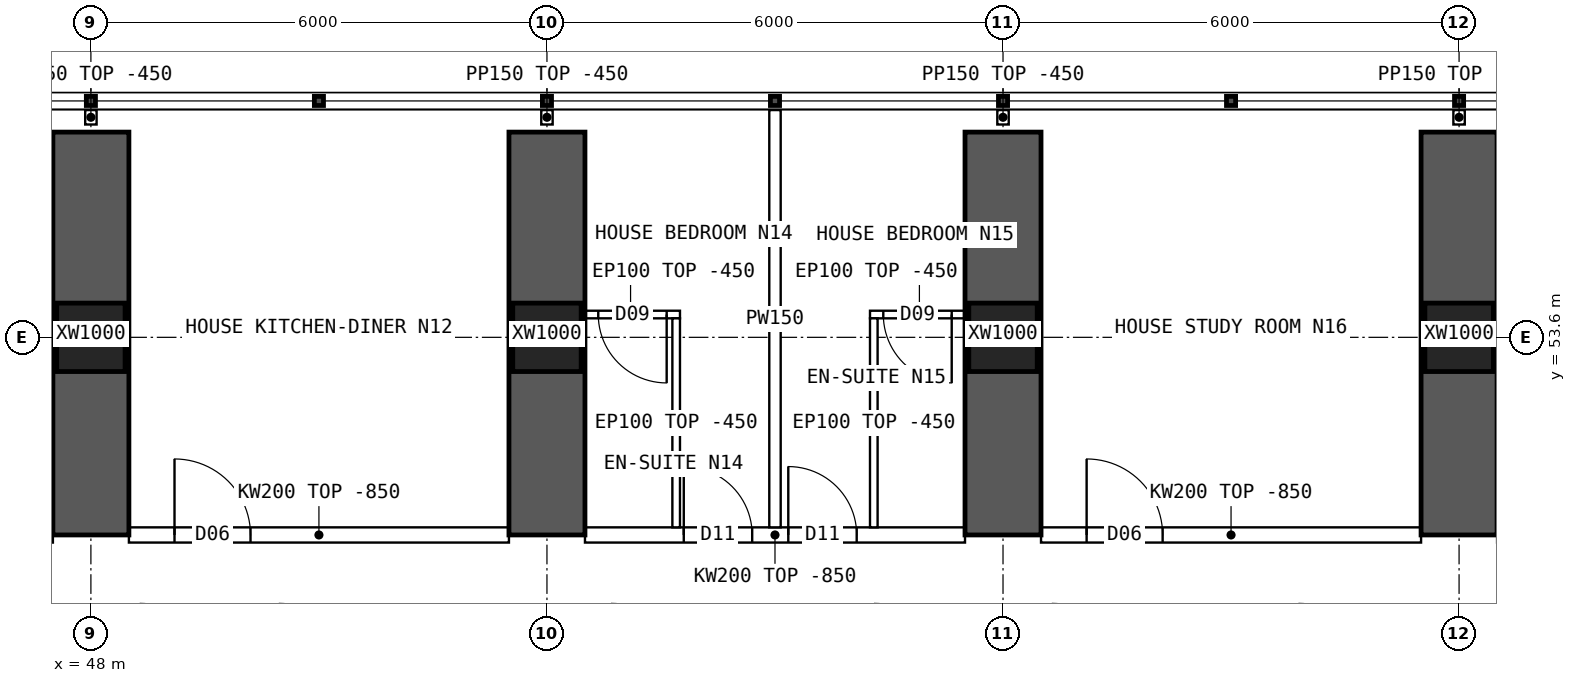
"""IFC4 building model, lengths in metres.
Left out: names, types, materials, properties, quantities, classifications, styles, units other than length and angle.
Written with IfcOpenShell. Run it as: python <this file> out.ifc"""

import sys

from ifc_helpers import new_model, si_unit, direction, frame, frame_2d, origin, origin_2d, place, context, subcontext, project, spatial, polyline, rectangle, hollow_rectangle, outline, extrude, element, fill, save


model = new_model("IFC4")
c1 = context("Model", 3, precision=1e-05, world=origin(), true_north=direction((0.0, 1.0)))
c2 = subcontext(c1, "Body", "Model", "MODEL_VIEW")
j1 = project(units=[si_unit("LENGTHUNIT", "METRE"), si_unit("PLANEANGLEUNIT", "RADIAN")], contexts=[c1])
p1 = place(None, origin())
s1 = spatial("IfcSite", under=j1, at=p1, CompositionType="ELEMENT")
p2 = place(p1, origin())
s2 = spatial("IfcBuilding", under=s1, at=p2, CompositionType="ELEMENT")
p3 = place(p2, frame((0.0, 0.0, 50.2)))
s3 = spatial("IfcBuildingStorey", under=s2, at=p3, CompositionType="ELEMENT", Elevation=50.2)
for number, where, z_axis, x_axis in (
    (1, (48.0, 53.6, 0.0), (0.0, 0.0, 1.0), (1.0, 0.0, 0.0)),
    (2, (54.0, 53.6, 0.0), (0.0, 0.0, 1.0), (1.0, 0.0, 0.0)),
    (3, (60.0, 53.6, 0.0), (0.0, 0.0, 1.0), (1.0, 0.0, 0.0)),
    (4, (66.0, 53.6, 0.0), (0.0, 0.0, 1.0), (1.0, 0.0, 0.0)),
):
    element("IfcColumn", number, at=place(p3, frame(where, z_axis=z_axis, x_axis=x_axis)), inside=s3, PredefinedType="COLUMN", context=c2, shape_type="SweptSolid", body=[
        extrude(hollow_rectangle(XDim=0.9, YDim=0.9, WallThickness=0.09, at=origin_2d()), origin(), (0.0, 0.0, 1.0), 3.75),
    ])
for number, where, z_axis, x_axis in (
    (5, (48.0, 51.0, 0.0), (0.0, 0.0, 1.0), (0.0, 1.0, 0.0)),
    (6, (54.0, 51.0, 0.0), (0.0, 0.0, 1.0), (0.0, 1.0, 0.0)),
    (7, (60.0, 51.0, 0.0), (0.0, 0.0, 1.0), (0.0, 1.0, 0.0)),
    (8, (66.0, 51.0, 0.0), (0.0, 0.0, 1.0), (0.0, 1.0, 0.0)),
):
    element("IfcWall", number, at=place(p3, frame(where, z_axis=z_axis, x_axis=x_axis)), inside=s3, PredefinedType="SHEAR", context=c2, shape_type="SweptSolid", body=[
        extrude(rectangle(XDim=5.3, YDim=1.0, at=frame_2d((2.65, 0.0))), origin(), (0.0, 0.0, 1.0), 3.75),
    ])
p4 = place(p3, frame((48.5, 51.0, 0.0), z_axis=(0.0, 0.0, 1.0), x_axis=(1.0, 0.0, 0.0)))
e9 = element("IfcWall", 9, at=p4, inside=s3, PredefinedType="SOLIDWALL", context=c2, shape_type="SweptSolid", body=[
    extrude(outline(polyline([(0.0, 0.0), (5.0, 0.0), (5.0, 2.9), (0.0, 2.9), (0.0, 0.0)])), frame((0.0, 0.1, 0.0), z_axis=(0.0, -1.0, 0.0), x_axis=(1.0, 0.0, 0.0)), (0.0, 0.0, 1.0), 0.2),
])
p5 = place(p4, frame((0.6, 0.0, 0.0)))
e10 = element("IfcOpeningElement", 10, at=p5, cuts=e9, PredefinedType="OPENING", context=c2, shape_type="SweptSolid", body=[
    extrude(rectangle(XDim=1.0, YDim=2.1, at=frame_2d((0.5, 1.05))), frame((0.0, 0.11, 0.0), z_axis=(0.0, -1.0, 0.0), x_axis=(1.0, 0.0, 0.0)), (0.0, 0.0, 1.0), 0.22),
])
p6 = place(p3, frame((54.5, 51.0, 0.0), z_axis=(0.0, 0.0, 1.0), x_axis=(1.0, 0.0, 0.0)))
e11 = element("IfcWall", 11, at=p6, inside=s3, PredefinedType="SOLIDWALL", context=c2, shape_type="SweptSolid", body=[
    extrude(outline(polyline([(0.0, 0.0), (5.0, 0.0), (5.0, 2.9), (0.0, 2.9), (0.0, 0.0)])), frame((0.0, 0.1, 0.0), z_axis=(0.0, -1.0, 0.0), x_axis=(1.0, 0.0, 0.0)), (0.0, 0.0, 1.0), 0.2),
])
p7 = place(p6, frame((1.3, 0.0, 0.0)))
e12 = element("IfcOpeningElement", 12, at=p7, cuts=e11, PredefinedType="OPENING", context=c2, shape_type="SweptSolid", body=[
    extrude(rectangle(XDim=0.9, YDim=2.1, at=frame_2d((0.45, 1.05))), frame((0.0, 0.11, 0.0), z_axis=(0.0, -1.0, 0.0), x_axis=(1.0, 0.0, 0.0)), (0.0, 0.0, 1.0), 0.22),
])
p8 = place(p6, frame((2.675, 0.0, 0.0)))
e13 = element("IfcOpeningElement", 13, at=p8, cuts=e11, PredefinedType="OPENING", context=c2, shape_type="SweptSolid", body=[
    extrude(rectangle(XDim=0.9, YDim=2.1, at=frame_2d((0.45, 1.05))), frame((0.0, 0.11, 0.0), z_axis=(0.0, -1.0, 0.0), x_axis=(1.0, 0.0, 0.0)), (0.0, 0.0, 1.0), 0.22),
])
p9 = place(p3, frame((60.5, 51.0, 0.0), z_axis=(0.0, 0.0, 1.0), x_axis=(1.0, 0.0, 0.0)))
e14 = element("IfcWall", 14, at=p9, inside=s3, PredefinedType="SOLIDWALL", context=c2, shape_type="SweptSolid", body=[
    extrude(outline(polyline([(0.0, 0.0), (5.0, 0.0), (5.0, 2.9), (0.0, 2.9), (0.0, 0.0)])), frame((0.0, 0.1, 0.0), z_axis=(0.0, -1.0, 0.0), x_axis=(1.0, 0.0, 0.0)), (0.0, 0.0, 1.0), 0.2),
])
p10 = place(p9, frame((0.6, 0.0, 0.0)))
e15 = element("IfcOpeningElement", 15, at=p10, cuts=e14, PredefinedType="OPENING", context=c2, shape_type="SweptSolid", body=[
    extrude(rectangle(XDim=1.0, YDim=2.1, at=frame_2d((0.5, 1.05))), frame((0.0, 0.11, 0.0), z_axis=(0.0, -1.0, 0.0), x_axis=(1.0, 0.0, 0.0)), (0.0, 0.0, 1.0), 0.22),
])
p11 = place(p3, frame((57.0, 56.59, 0.0), z_axis=(0.0, 0.0, 1.0), x_axis=(0.0, -1.0, 0.0)))
e16 = element("IfcWall", 16, at=p11, inside=s3, PredefinedType="PARTITIONING", context=c2, shape_type="SweptSolid", body=[
    extrude(outline(polyline([(0.0, 0.0), (5.49, 0.0), (5.49, 2.9), (5.442, 2.9), (5.44, 3.3), (3.192, 3.3), (3.19, 2.9), (2.792, 2.9), (2.79, 3.3), (0.0, 3.3), (0.0, 0.0)])), frame((0.0, 0.075, 0.0), z_axis=(0.0, -1.0, 0.0), x_axis=(1.0, 0.0, 0.0)), (0.0, 0.0, 1.0), 0.15),
])
p12 = place(p3, frame((54.45, 53.9, 0.0), z_axis=(0.0, 0.0, 1.0), x_axis=(1.0, 0.0, 0.0)))
e17 = element("IfcWall", 17, at=p12, inside=s3, PredefinedType="PARTITIONING", context=c2, shape_type="SweptSolid", body=[
    extrude(rectangle(XDim=1.3, YDim=0.1, at=frame_2d((0.65, 0.0))), origin(), (0.0, 0.0, 1.0), 3.3),
])
p13 = place(p12, frame((0.225, 0.0, 0.0)))
e18 = element("IfcOpeningElement", 18, at=p13, cuts=e17, PredefinedType="OPENING", context=c2, shape_type="SweptSolid", body=[
    extrude(rectangle(XDim=0.9, YDim=2.1, at=frame_2d((0.45, 1.05))), frame((0.0, 0.06, 0.0), z_axis=(0.0, -1.0, 0.0), x_axis=(1.0, 0.0, 0.0)), (0.0, 0.0, 1.0), 0.12),
])
p14 = place(p3, frame((55.7, 53.85, 0.0), z_axis=(0.0, 0.0, 1.0), x_axis=(0.0, -1.0, 0.0)))
e19 = element("IfcWall", 19, at=p14, inside=s3, PredefinedType="PARTITIONING", context=c2, shape_type="SweptSolid", body=[
    extrude(outline(polyline([(0.0, 0.0), (2.75, 0.0), (2.75, 2.9), (2.702, 2.9), (2.7, 3.3), (0.452, 3.3), (0.45, 2.9), (0.0, 2.9), (0.0, 0.0)])), frame((0.0, 0.05, 0.0), z_axis=(0.0, -1.0, 0.0), x_axis=(1.0, 0.0, 0.0)), (0.0, 0.0, 1.0), 0.1),
])
p15 = place(p3, frame((58.25, 53.9, 0.0), z_axis=(0.0, 0.0, 1.0), x_axis=(1.0, 0.0, 0.0)))
e20 = element("IfcWall", 20, at=p15, inside=s3, PredefinedType="PARTITIONING", context=c2, shape_type="SweptSolid", body=[
    extrude(rectangle(XDim=1.3, YDim=0.1, at=frame_2d((0.65, 0.0))), origin(), (0.0, 0.0, 1.0), 3.3),
])
p16 = place(p15, frame((0.175, 0.0, 0.0)))
e21 = element("IfcOpeningElement", 21, at=p16, cuts=e20, PredefinedType="OPENING", context=c2, shape_type="SweptSolid", body=[
    extrude(rectangle(XDim=0.9, YDim=2.1, at=frame_2d((0.45, 1.05))), frame((0.0, 0.06, 0.0), z_axis=(0.0, -1.0, 0.0), x_axis=(1.0, 0.0, 0.0)), (0.0, 0.0, 1.0), 0.12),
])
p17 = place(p3, frame((58.3, 53.85, 0.0), z_axis=(0.0, 0.0, 1.0), x_axis=(0.0, -1.0, 0.0)))
e22 = element("IfcWall", 22, at=p17, inside=s3, PredefinedType="PARTITIONING", context=c2, shape_type="SweptSolid", body=[
    extrude(outline(polyline([(0.0, 0.0), (2.75, 0.0), (2.75, 2.9), (2.702, 2.9), (2.7, 3.3), (0.452, 3.3), (0.45, 2.9), (0.0, 2.9), (0.0, 0.0)])), frame((0.0, 0.05, 0.0), z_axis=(0.0, -1.0, 0.0), x_axis=(1.0, 0.0, 0.0)), (0.0, 0.0, 1.0), 0.1),
])
p18 = place(p3, frame((66.45, 53.9, 0.0), z_axis=(0.0, 0.0, 1.0), x_axis=(1.0, 0.0, 0.0)))
e23 = element("IfcWall", 23, at=p18, inside=s3, PredefinedType="PARTITIONING", context=c2, shape_type="SweptSolid", body=[
    extrude(rectangle(XDim=1.3, YDim=0.1, at=frame_2d((0.65, 0.0))), origin(), (0.0, 0.0, 1.0), 3.3),
])
p19 = place(p18, frame((0.225, 0.0, 0.0)))
e24 = element("IfcOpeningElement", 24, at=p19, cuts=e23, PredefinedType="OPENING", context=c2, shape_type="SweptSolid", body=[
    extrude(rectangle(XDim=0.9, YDim=2.1, at=frame_2d((0.45, 1.05))), frame((0.0, 0.06, 0.0), z_axis=(0.0, -1.0, 0.0), x_axis=(1.0, 0.0, 0.0)), (0.0, 0.0, 1.0), 0.12),
])
for number, where, z_axis, x_axis in (
    (25, (48.0, 56.4, 0.0), (0.0, 0.0, 1.0), (0.0, 1.0, 0.0)),
    (26, (54.0, 56.4, 0.0), (0.0, 0.0, 1.0), (0.0, 1.0, 0.0)),
    (27, (60.0, 56.4, 0.0), (0.0, 0.0, 1.0), (0.0, 1.0, 0.0)),
    (28, (66.0, 56.4, 0.0), (0.0, 0.0, 1.0), (0.0, 1.0, 0.0)),
):
    element("IfcWall", number, at=place(p3, frame(where, z_axis=z_axis, x_axis=x_axis)), inside=s3, PredefinedType="PARTITIONING", context=c2, shape_type="SweptSolid", body=[
        extrude(rectangle(XDim=0.19, YDim=0.15, at=frame_2d((0.095, 0.0))), origin(), (0.0, 0.0, 1.0), 3.3),
    ])
p20 = place(p5, origin())
e29 = element("IfcDoor", 29, at=p20, inside=s3, OperationType="SINGLE_SWING_LEFT", PredefinedType="DOOR", context=c2, shape_type="SweptSolid", body=[
    extrude(rectangle(XDim=1.0, YDim=2.1, at=frame_2d((0.5, 1.05))), frame((0.0, 0.025, 0.0), z_axis=(0.0, -1.0, 0.0), x_axis=(1.0, 0.0, 0.0)), (0.0, 0.0, 1.0), 0.05),
])
fill(e10, e29)
p21 = place(p13, origin())
e30 = element("IfcDoor", 30, at=p21, inside=s3, OperationType="SINGLE_SWING_RIGHT", PredefinedType="DOOR", context=c2, shape_type="SweptSolid", body=[
    extrude(rectangle(XDim=0.9, YDim=2.1, at=frame_2d((0.45, 1.05))), frame((0.0, 0.025, 0.0), z_axis=(0.0, -1.0, 0.0), x_axis=(1.0, 0.0, 0.0)), (0.0, 0.0, 1.0), 0.05),
])
fill(e18, e30)
p22 = place(p7, origin())
e31 = element("IfcDoor", 31, at=p22, inside=s3, OperationType="SINGLE_SWING_LEFT", PredefinedType="DOOR", context=c2, shape_type="SweptSolid", body=[
    extrude(rectangle(XDim=0.9, YDim=2.1, at=frame_2d((0.45, 1.05))), frame((0.0, 0.025, 0.0), z_axis=(0.0, -1.0, 0.0), x_axis=(1.0, 0.0, 0.0)), (0.0, 0.0, 1.0), 0.05),
])
fill(e12, e31)
p23 = place(p16, origin())
e32 = element("IfcDoor", 32, at=p23, inside=s3, OperationType="SINGLE_SWING_RIGHT", PredefinedType="DOOR", context=c2, shape_type="SweptSolid", body=[
    extrude(rectangle(XDim=0.9, YDim=2.1, at=frame_2d((0.45, 1.05))), frame((0.0, 0.025, 0.0), z_axis=(0.0, -1.0, 0.0), x_axis=(1.0, 0.0, 0.0)), (0.0, 0.0, 1.0), 0.05),
])
fill(e21, e32)
p24 = place(p8, origin())
e33 = element("IfcDoor", 33, at=p24, inside=s3, OperationType="SINGLE_SWING_LEFT", PredefinedType="DOOR", context=c2, shape_type="SweptSolid", body=[
    extrude(rectangle(XDim=0.9, YDim=2.1, at=frame_2d((0.45, 1.05))), frame((0.0, 0.025, 0.0), z_axis=(0.0, -1.0, 0.0), x_axis=(1.0, 0.0, 0.0)), (0.0, 0.0, 1.0), 0.05),
])
fill(e13, e33)
p25 = place(p10, origin())
e34 = element("IfcDoor", 34, at=p25, inside=s3, OperationType="SINGLE_SWING_LEFT", PredefinedType="DOOR", context=c2, shape_type="SweptSolid", body=[
    extrude(rectangle(XDim=1.0, YDim=2.1, at=frame_2d((0.5, 1.05))), frame((0.0, 0.025, 0.0), z_axis=(0.0, -1.0, 0.0), x_axis=(1.0, 0.0, 0.0)), (0.0, 0.0, 1.0), 0.05),
])
fill(e15, e34)
save(model, sys.argv[1])
